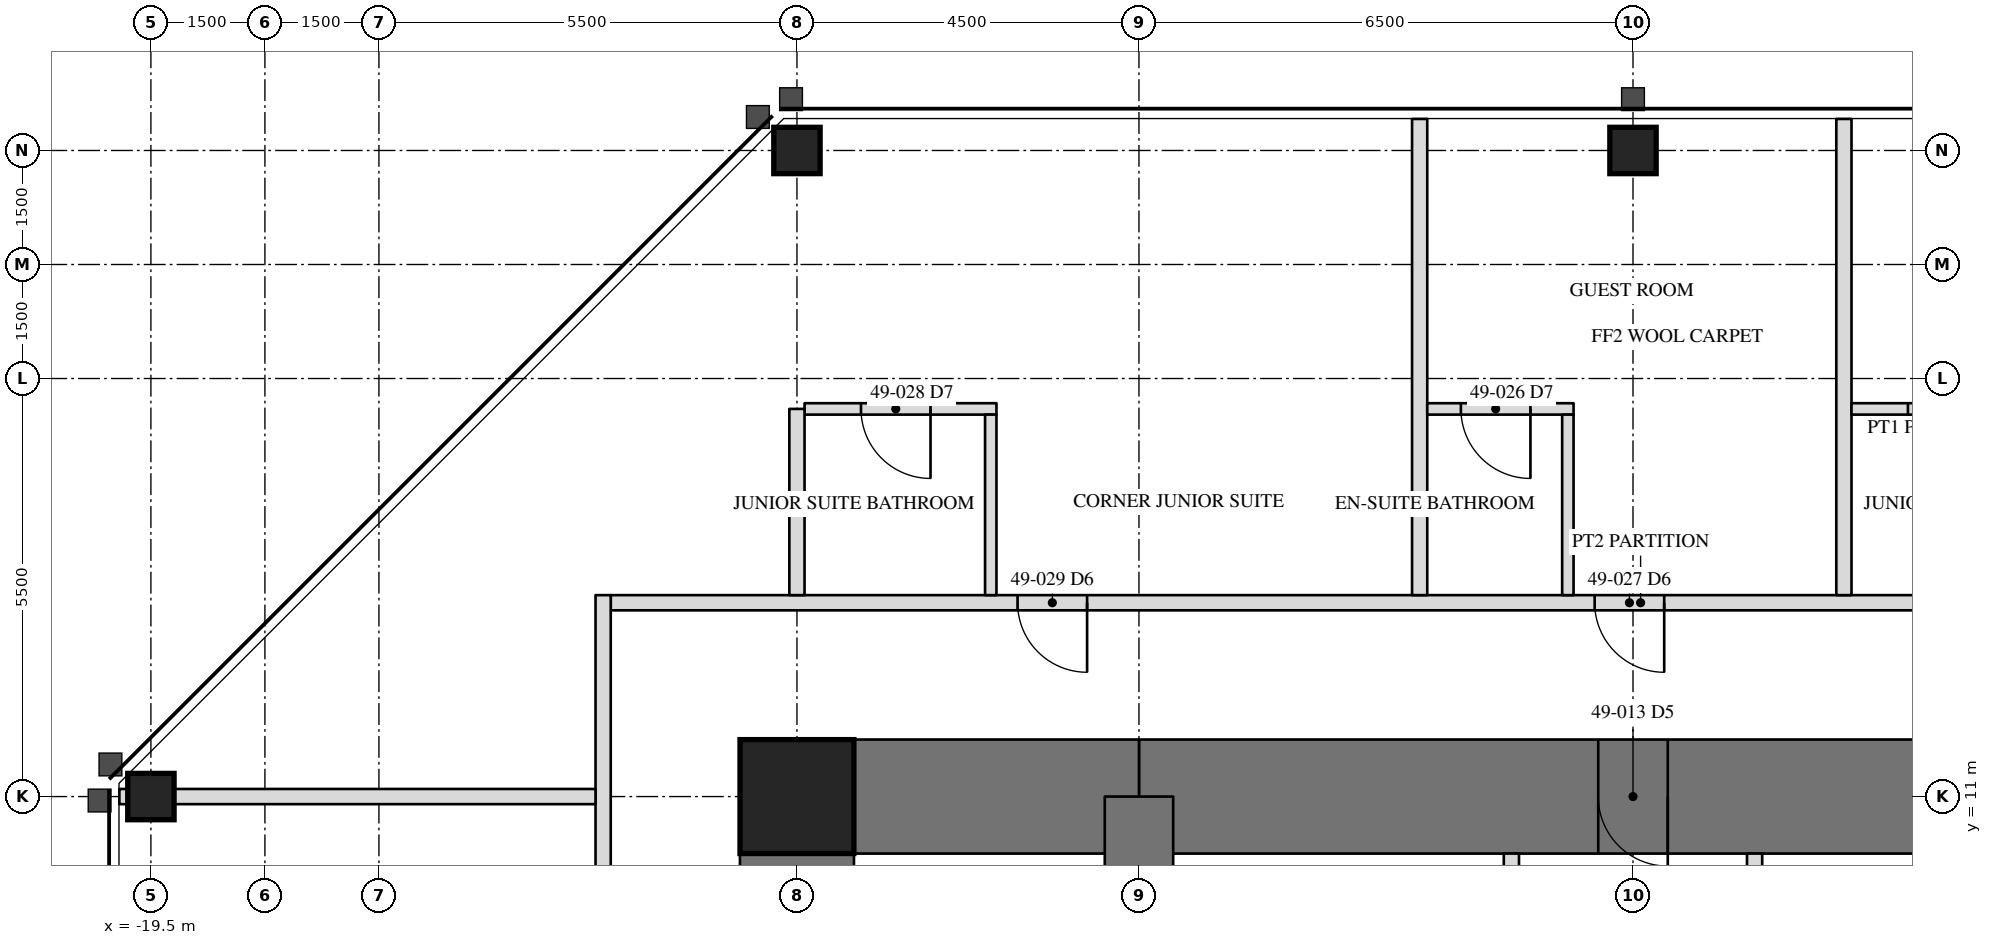
"""IFC4 building model, lengths in metres.
Left out: names, types, materials, properties, quantities, classifications, styles, units other than length and angle.
Written with IfcOpenShell. Run it as: python <this file> out.ifc"""

import sys

from ifc_helpers import new_model, si_unit, direction, frame, frame_2d, origin, origin_2d, place, context, subcontext, project, spatial, rectangle, hollow_rectangle, extrude, element, fill, save


model = new_model("IFC4")
c1 = context("Model", 3, precision=1e-05, world=origin(), true_north=direction((0.0, 1.0)))
c2 = subcontext(c1, "Body", "Model", "MODEL_VIEW")
j1 = project(units=[si_unit("LENGTHUNIT", "METRE"), si_unit("PLANEANGLEUNIT", "RADIAN")], contexts=[c1])
p1 = place(None, origin())
s1 = spatial("IfcSite", under=j1, at=p1, CompositionType="ELEMENT")
p2 = place(p1, origin())
s2 = spatial("IfcBuilding", under=s1, at=p2, CompositionType="ELEMENT")
p3 = place(p2, frame((0.0, 0.0, 208.2)))
s3 = spatial("IfcBuildingStorey", under=s2, at=p3, CompositionType="ELEMENT", Elevation=208.2)
for number, where, z_axis, x_axis in (
    (1, (0.0, 19.5, 0.0), (0.0, 0.0, 1.0), (1.0, 0.0, 0.0)),
    (2, (-11.0, 19.5, 0.0), (0.0, 0.0, 1.0), (1.0, 0.0, 0.0)),
    (3, (-19.5, 11.0, 0.0), (0.0, 0.0, 1.0), (0.0, 1.0, 0.0)),
):
    element("IfcColumn", number, at=place(p3, frame(where, z_axis=z_axis, x_axis=x_axis)), inside=s3, PredefinedType="COLUMN", context=c2, shape_type="SweptSolid", body=[
        extrude(hollow_rectangle(XDim=0.61, YDim=0.61, WallThickness=0.076, at=origin_2d()), origin(), (0.0, 0.0, 1.0), 3.5),
    ])
p4 = place(p3, frame((-11.0, 11.0, 0.0), z_axis=(0.0, 0.0, 1.0), x_axis=(0.0, -1.0, 0.0)))
e4 = element("IfcWall", 4, at=p4, inside=s3, PredefinedType="SHEAR", context=c2, shape_type="SweptSolid", body=[
    extrude(rectangle(XDim=22.0, YDim=1.5, at=frame_2d((11.0, 0.0))), origin(), (0.0, 0.0, 1.0), 3.5),
])
p5 = place(p4, frame((15.393, 0.0, 0.0)))
e5 = element("IfcOpeningElement", 5, at=p5, cuts=e4, PredefinedType="OPENING", context=c2, shape_type="SweptSolid", body=[
    extrude(rectangle(XDim=0.915, YDim=2.134, at=frame_2d((0.458, 1.067))), frame((0.0, 0.76, 0.0), z_axis=(0.0, -1.0, 0.0), x_axis=(1.0, 0.0, 0.0)), (0.0, 0.0, 1.0), 1.52),
])
p6 = place(p3, frame((6.5, 11.0, 0.0), z_axis=(0.0, 0.0, 1.0), x_axis=(-1.0, 0.0, 0.0)))
e6 = element("IfcWall", 6, at=p6, inside=s3, PredefinedType="SHEAR", context=c2, shape_type="SweptSolid", body=[
    extrude(rectangle(XDim=13.0, YDim=1.5, at=frame_2d((6.5, 0.0))), origin(), (0.0, 0.0, 1.0), 3.5),
])
p7 = place(p6, frame((6.042, 0.0, 0.0)))
e7 = element("IfcOpeningElement", 7, at=p7, cuts=e6, PredefinedType="OPENING", context=c2, shape_type="SweptSolid", body=[
    extrude(rectangle(XDim=0.915, YDim=2.134, at=frame_2d((0.458, 1.067))), frame((0.0, 0.76, 0.0), z_axis=(0.0, -1.0, 0.0), x_axis=(1.0, 0.0, 0.0)), (0.0, 0.0, 1.0), 1.52),
])
p8 = place(p3, frame((-6.5, 11.0, 0.0), z_axis=(0.0, 0.0, 1.0), x_axis=(-1.0, 0.0, 0.0)))
e8 = element("IfcWall", 8, at=p8, inside=s3, PredefinedType="SHEAR", context=c2, shape_type="SweptSolid", body=[
    extrude(rectangle(XDim=4.5, YDim=1.5, at=frame_2d((2.25, 0.0))), origin(), (0.0, 0.0, 1.0), 3.5),
])
p9 = place(p3, frame((-6.5, 11.0, 0.0), z_axis=(0.0, 0.0, 1.0), x_axis=(0.0, -1.0, 0.0)))
e9 = element("IfcWall", 9, at=p9, inside=s3, PredefinedType="SHEAR", context=c2, shape_type="SweptSolid", body=[
    extrude(rectangle(XDim=4.5, YDim=0.9, at=frame_2d((2.25, 0.0))), origin(), (0.0, 0.0, 1.0), 3.5),
])
p10 = place(p3, frame((-11.0, 11.0, 0.0), z_axis=(0.0, 0.0, 1.0), x_axis=(1.0, 0.0, 0.0)))
e10 = element("IfcColumn", 10, at=p10, inside=s3, PredefinedType="COLUMN", context=c2, shape_type="SweptSolid", body=[
    extrude(hollow_rectangle(XDim=1.499, YDim=1.499, WallThickness=0.102, at=origin_2d()), origin(), (0.0, 0.0, 1.0), 3.5),
])
p11 = place(p3, frame((-1.6, 6.95, 0.0), z_axis=(0.0, 0.0, 1.0), x_axis=(0.0, 1.0, 0.0)))
e11 = element("IfcWall", 11, at=p11, inside=s3, PredefinedType="PARTITIONING", context=c2, shape_type="SweptSolid", body=[
    extrude(rectangle(XDim=3.3, YDim=0.2, at=frame_2d((1.65, 0.0))), origin(), (0.0, 0.0, 1.0), 3.31),
])
p12 = place(p11, frame((1.192, 0.0, 0.0)))
e12 = element("IfcOpeningElement", 12, at=p12, cuts=e11, PredefinedType="OPENING", context=c2, shape_type="SweptSolid", body=[
    extrude(rectangle(XDim=0.915, YDim=2.134, at=frame_2d((0.458, 1.067))), frame((0.0, 0.11, 0.0), z_axis=(0.0, -1.0, 0.0), x_axis=(1.0, 0.0, 0.0)), (0.0, 0.0, 1.0), 0.22),
])
p13 = place(p3, frame((1.6, 6.95, 0.0), z_axis=(0.0, 0.0, 1.0), x_axis=(0.0, 1.0, 0.0)))
e13 = element("IfcWall", 13, at=p13, inside=s3, PredefinedType="PARTITIONING", context=c2, shape_type="SweptSolid", body=[
    extrude(rectangle(XDim=3.3, YDim=0.2, at=frame_2d((1.65, 0.0))), origin(), (0.0, 0.0, 1.0), 3.31),
])
p14 = place(p13, frame((1.192, 0.0, 0.0)))
e14 = element("IfcOpeningElement", 14, at=p14, cuts=e13, PredefinedType="OPENING", context=c2, shape_type="SweptSolid", body=[
    extrude(rectangle(XDim=0.915, YDim=2.134, at=frame_2d((0.458, 1.067))), frame((0.0, 0.11, 0.0), z_axis=(0.0, -1.0, 0.0), x_axis=(1.0, 0.0, 0.0)), (0.0, 0.0, 1.0), 0.22),
])
p15 = place(p3, frame((13.65, 13.55, 0.0), z_axis=(0.0, 0.0, 1.0), x_axis=(-1.0, 0.0, 0.0)))
e15 = element("IfcWall", 15, at=p15, inside=s3, PredefinedType="PARTITIONING", context=c2, shape_type="SweptSolid", body=[
    extrude(rectangle(XDim=27.1, YDim=0.2, at=frame_2d((13.55, 0.0))), origin(), (0.0, 0.0, 1.0), 3.31),
])
p16 = place(p15, frame((7.058, 0.0, 0.0)))
e16 = element("IfcOpeningElement", 16, at=p16, cuts=e15, PredefinedType="OPENING", context=c2, shape_type="SweptSolid", body=[
    extrude(rectangle(XDim=0.915, YDim=2.134, at=frame_2d((0.458, 1.067))), frame((0.0, 0.11, 0.0), z_axis=(0.0, -1.0, 0.0), x_axis=(1.0, 0.0, 0.0)), (0.0, 0.0, 1.0), 0.22),
])
p17 = place(p15, frame((13.24, 0.0, 0.0)))
e17 = element("IfcOpeningElement", 17, at=p17, cuts=e15, PredefinedType="OPENING", context=c2, shape_type="SweptSolid", body=[
    extrude(rectangle(XDim=0.915, YDim=2.134, at=frame_2d((0.458, 1.067))), frame((0.0, 0.11, 0.0), z_axis=(0.0, -1.0, 0.0), x_axis=(1.0, 0.0, 0.0)), (0.0, 0.0, 1.0), 0.22),
])
p18 = place(p15, frame((20.833, 0.0, 0.0)))
e18 = element("IfcOpeningElement", 18, at=p18, cuts=e15, PredefinedType="OPENING", context=c2, shape_type="SweptSolid", body=[
    extrude(rectangle(XDim=0.915, YDim=2.134, at=frame_2d((0.458, 1.067))), frame((0.0, 0.11, 0.0), z_axis=(0.0, -1.0, 0.0), x_axis=(1.0, 0.0, 0.0)), (0.0, 0.0, 1.0), 0.22),
])
p19 = place(p3, frame((-13.55, 13.65, 0.0), z_axis=(0.0, 0.0, 1.0), x_axis=(0.0, -1.0, 0.0)))
e19 = element("IfcWall", 19, at=p19, inside=s3, PredefinedType="PARTITIONING", context=c2, shape_type="SweptSolid", body=[
    extrude(rectangle(XDim=27.1, YDim=0.2, at=frame_2d((13.55, 0.0))), origin(), (0.0, 0.0, 1.0), 3.31),
])
p20 = place(p19, frame((4.884, 0.0, 0.0)))
e20 = element("IfcOpeningElement", 20, at=p20, cuts=e19, PredefinedType="OPENING", context=c2, shape_type="SweptSolid", body=[
    extrude(rectangle(XDim=0.915, YDim=2.134, at=frame_2d((0.458, 1.067))), frame((0.0, 0.11, 0.0), z_axis=(0.0, -1.0, 0.0), x_axis=(1.0, 0.0, 0.0)), (0.0, 0.0, 1.0), 0.22),
])
p21 = place(p19, frame((10.433, 0.0, 0.0)))
e21 = element("IfcOpeningElement", 21, at=p21, cuts=e19, PredefinedType="OPENING", context=c2, shape_type="SweptSolid", body=[
    extrude(rectangle(XDim=0.915, YDim=2.134, at=frame_2d((0.458, 1.067))), frame((0.0, 0.11, 0.0), z_axis=(0.0, -1.0, 0.0), x_axis=(1.0, 0.0, 0.0)), (0.0, 0.0, 1.0), 0.22),
])
p22 = place(p19, frame((16.046, 0.0, 0.0)))
e22 = element("IfcOpeningElement", 22, at=p22, cuts=e19, PredefinedType="OPENING", context=c2, shape_type="SweptSolid", body=[
    extrude(rectangle(XDim=0.915, YDim=2.134, at=frame_2d((0.458, 1.067))), frame((0.0, 0.11, 0.0), z_axis=(0.0, -1.0, 0.0), x_axis=(1.0, 0.0, 0.0)), (0.0, 0.0, 1.0), 0.22),
])
p23 = place(p19, frame((21.433, 0.0, 0.0)))
e23 = element("IfcOpeningElement", 23, at=p23, cuts=e19, PredefinedType="OPENING", context=c2, shape_type="SweptSolid", body=[
    extrude(rectangle(XDim=0.915, YDim=2.134, at=frame_2d((0.458, 1.067))), frame((0.0, 0.11, 0.0), z_axis=(0.0, -1.0, 0.0), x_axis=(1.0, 0.0, 0.0)), (0.0, 0.0, 1.0), 0.22),
])
for number, where, z_axis, x_axis in (
    (24, (2.775, 13.65, 0.0), (0.0, 0.0, 1.0), (0.0, 1.0, 0.0)),
    (25, (-2.807, 13.65, 0.0), (0.0, 0.0, 1.0), (0.0, 1.0, 0.0)),
):
    element("IfcWall", number, at=place(p3, frame(where, z_axis=z_axis, x_axis=x_axis)), inside=s3, PredefinedType="PARTITIONING", context=c2, shape_type="SweptSolid", body=[
        extrude(rectangle(XDim=6.265, YDim=0.2, at=frame_2d((3.133, 0.0))), origin(), (0.0, 0.0, 1.0), 3.31),
    ])
p24 = place(p3, frame((5.4, 16.1, 0.0), z_axis=(0.0, 0.0, 1.0), x_axis=(-1.0, 0.0, 0.0)))
e26 = element("IfcWall", 26, at=p24, inside=s3, PredefinedType="PARTITIONING", context=c2, shape_type="SweptSolid", body=[
    extrude(rectangle(XDim=2.525, YDim=0.15, at=frame_2d((1.262, 0.0))), origin(), (0.0, 0.0, 1.0), 3.31),
])
p25 = place(p24, frame((0.867, 0.0, 0.0)))
e27 = element("IfcOpeningElement", 27, at=p25, cuts=e26, PredefinedType="OPENING", context=c2, shape_type="SweptSolid", body=[
    extrude(rectangle(XDim=0.915, YDim=2.032, at=frame_2d((0.458, 1.016))), frame((0.0, 0.085, 0.0), z_axis=(0.0, -1.0, 0.0), x_axis=(1.0, 0.0, 0.0)), (0.0, 0.0, 1.0), 0.17),
])
p26 = place(p3, frame((-0.782, 16.1, 0.0), z_axis=(0.0, 0.0, 1.0), x_axis=(-1.0, 0.0, 0.0)))
e28 = element("IfcWall", 28, at=p26, inside=s3, PredefinedType="PARTITIONING", context=c2, shape_type="SweptSolid", body=[
    extrude(rectangle(XDim=1.925, YDim=0.15, at=frame_2d((0.962, 0.0))), origin(), (0.0, 0.0, 1.0), 3.31),
])
p27 = place(p26, frame((0.567, 0.0, 0.0)))
e29 = element("IfcOpeningElement", 29, at=p27, cuts=e28, PredefinedType="OPENING", context=c2, shape_type="SweptSolid", body=[
    extrude(rectangle(XDim=0.915, YDim=2.032, at=frame_2d((0.458, 1.016))), frame((0.0, 0.085, 0.0), z_axis=(0.0, -1.0, 0.0), x_axis=(1.0, 0.0, 0.0)), (0.0, 0.0, 1.0), 0.17),
])
p28 = place(p3, frame((-0.857, 13.65, 0.0), z_axis=(0.0, 0.0, 1.0), x_axis=(0.0, 1.0, 0.0)))
e30 = element("IfcWall", 30, at=p28, inside=s3, PredefinedType="PARTITIONING", context=c2, shape_type="SweptSolid", body=[
    extrude(rectangle(XDim=2.375, YDim=0.15, at=frame_2d((1.188, 0.0))), origin(), (0.0, 0.0, 1.0), 3.31),
])
p29 = place(p3, frame((-8.375, 16.1, 0.0), z_axis=(0.0, 0.0, 1.0), x_axis=(-1.0, 0.0, 0.0)))
e31 = element("IfcWall", 31, at=p29, inside=s3, PredefinedType="PARTITIONING", context=c2, shape_type="SweptSolid", body=[
    extrude(rectangle(XDim=2.525, YDim=0.15, at=frame_2d((1.262, 0.0))), origin(), (0.0, 0.0, 1.0), 3.31),
])
p30 = place(p29, frame((0.867, 0.0, 0.0)))
e32 = element("IfcOpeningElement", 32, at=p30, cuts=e31, PredefinedType="OPENING", context=c2, shape_type="SweptSolid", body=[
    extrude(rectangle(XDim=0.915, YDim=2.032, at=frame_2d((0.458, 1.016))), frame((0.0, 0.085, 0.0), z_axis=(0.0, -1.0, 0.0), x_axis=(1.0, 0.0, 0.0)), (0.0, 0.0, 1.0), 0.17),
])
p31 = place(p3, frame((-8.45, 13.65, 0.0), z_axis=(0.0, 0.0, 1.0), x_axis=(0.0, 1.0, 0.0)))
e33 = element("IfcWall", 33, at=p31, inside=s3, PredefinedType="PARTITIONING", context=c2, shape_type="SweptSolid", body=[
    extrude(rectangle(XDim=2.375, YDim=0.15, at=frame_2d((1.188, 0.0))), origin(), (0.0, 0.0, 1.0), 3.31),
])
p32 = place(p3, frame((-11.0, 13.65, 0.0), z_axis=(0.0, 0.0, 1.0), x_axis=(0.0, 1.0, 0.0)))
e34 = element("IfcWall", 34, at=p32, inside=s3, PredefinedType="PARTITIONING", context=c2, shape_type="SweptSolid", body=[
    extrude(rectangle(XDim=2.45, YDim=0.2, at=frame_2d((1.225, 0.0))), origin(), (0.0, 0.0, 1.0), 2.802),
])
p33 = place(p3, frame((-13.65, 11.0, 0.0), z_axis=(0.0, 0.0, 1.0), x_axis=(-1.0, 0.0, 0.0)))
e35 = element("IfcWall", 35, at=p33, inside=s3, PredefinedType="PARTITIONING", context=c2, shape_type="SweptSolid", body=[
    extrude(rectangle(XDim=6.265, YDim=0.2, at=frame_2d((3.133, 0.0))), origin(), (0.0, 0.0, 1.0), 2.802),
])
p34 = place(p7, origin())
e36 = element("IfcDoor", 36, at=p34, inside=s3, OperationType="SINGLE_SWING_RIGHT", PredefinedType="DOOR", context=c2, shape_type="SweptSolid", body=[
    extrude(rectangle(XDim=0.915, YDim=2.134, at=frame_2d((0.458, 1.067))), frame((0.0, 0.025, 0.0), z_axis=(0.0, -1.0, 0.0), x_axis=(1.0, 0.0, 0.0)), (0.0, 0.0, 1.0), 0.05),
])
fill(e7, e36)
p35 = place(p25, origin())
e37 = element("IfcDoor", 37, at=p35, inside=s3, OperationType="SINGLE_SWING_LEFT", PredefinedType="DOOR", context=c2, shape_type="SweptSolid", body=[
    extrude(rectangle(XDim=0.915, YDim=2.032, at=frame_2d((0.458, 1.016))), frame((0.0, 0.025, 0.0), z_axis=(0.0, -1.0, 0.0), x_axis=(1.0, 0.0, 0.0)), (0.0, 0.0, 1.0), 0.05),
])
fill(e27, e37)
p36 = place(p27, origin())
e38 = element("IfcDoor", 38, at=p36, inside=s3, OperationType="SINGLE_SWING_LEFT", PredefinedType="DOOR", context=c2, shape_type="SweptSolid", body=[
    extrude(rectangle(XDim=0.915, YDim=2.032, at=frame_2d((0.458, 1.016))), frame((0.0, 0.025, 0.0), z_axis=(0.0, -1.0, 0.0), x_axis=(1.0, 0.0, 0.0)), (0.0, 0.0, 1.0), 0.05),
])
fill(e29, e38)
p37 = place(p17, origin())
e39 = element("IfcDoor", 39, at=p37, inside=s3, OperationType="SINGLE_SWING_LEFT", PredefinedType="DOOR", context=c2, shape_type="SweptSolid", body=[
    extrude(rectangle(XDim=0.915, YDim=2.134, at=frame_2d((0.458, 1.067))), frame((0.0, 0.025, 0.0), z_axis=(0.0, -1.0, 0.0), x_axis=(1.0, 0.0, 0.0)), (0.0, 0.0, 1.0), 0.05),
])
fill(e17, e39)
p38 = place(p30, origin())
e40 = element("IfcDoor", 40, at=p38, inside=s3, OperationType="SINGLE_SWING_LEFT", PredefinedType="DOOR", context=c2, shape_type="SweptSolid", body=[
    extrude(rectangle(XDim=0.915, YDim=2.032, at=frame_2d((0.458, 1.016))), frame((0.0, 0.025, 0.0), z_axis=(0.0, -1.0, 0.0), x_axis=(1.0, 0.0, 0.0)), (0.0, 0.0, 1.0), 0.05),
])
fill(e32, e40)
p39 = place(p18, origin())
e41 = element("IfcDoor", 41, at=p39, inside=s3, OperationType="SINGLE_SWING_LEFT", PredefinedType="DOOR", context=c2, shape_type="SweptSolid", body=[
    extrude(rectangle(XDim=0.915, YDim=2.134, at=frame_2d((0.458, 1.067))), frame((0.0, 0.025, 0.0), z_axis=(0.0, -1.0, 0.0), x_axis=(1.0, 0.0, 0.0)), (0.0, 0.0, 1.0), 0.05),
])
fill(e18, e41)
save(model, sys.argv[1])
